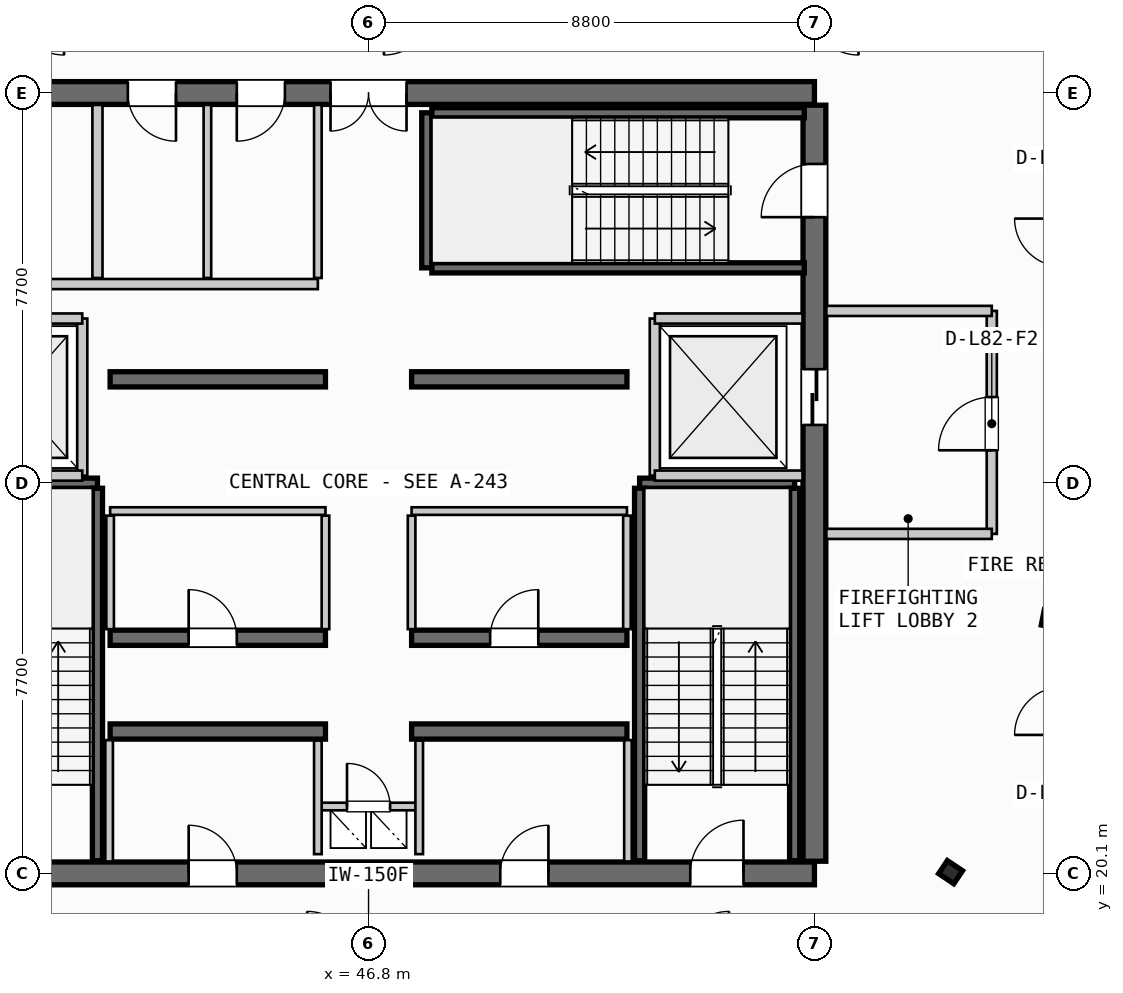
"""IFC4 building model, lengths in metres.
Left out: names, types, materials, properties, quantities, classifications, styles, units other than length and angle.
Written with IfcOpenShell. Run it as: python <this file> out.ifc"""

import sys

from ifc_helpers import new_model, si_unit, direction, frame, frame_2d, origin, origin_2d, place, context, subcontext, project, spatial, rectangle, i_section, extrude, source, transform, mapped, element, fill, save


model = new_model("IFC4")
c1 = context("Model", 3, precision=1e-05, world=origin(), true_north=direction((0.0, 1.0)))
c2 = subcontext(c1, "Body", "Model", "MODEL_VIEW")
j1 = project(units=[si_unit("LENGTHUNIT", "METRE"), si_unit("PLANEANGLEUNIT", "RADIAN")], contexts=[c1])
p1 = place(None, origin())
s1 = spatial("IfcSite", under=j1, at=p1, CompositionType="ELEMENT")
p2 = place(p1, origin())
s2 = spatial("IfcBuilding", under=s1, at=p2, CompositionType="ELEMENT")
p3 = place(p2, frame((0.0, 0.0, 308.3)))
s3 = spatial("IfcBuildingStorey", under=s2, at=p3, CompositionType="ELEMENT", Elevation=308.3)
p4 = place(p3, frame((38.0, 20.1, 0.0), z_axis=(0.0, 0.0, 1.0), x_axis=(1.0, 0.0, 0.0)))
e1 = element("IfcWall", 1, at=p4, inside=s3, PredefinedType="SHEAR", context=c2, shape_type="SweptSolid", body=[
    extrude(rectangle(XDim=17.6, YDim=0.45, at=frame_2d((8.8, 0.0))), origin(), (0.0, 0.0, 1.0), 3.735),
])
p5 = place(p4, frame((1.4, 0.0, 0.0)))
e2 = element("IfcOpeningElement", 2, at=p5, cuts=e1, PredefinedType="OPENING", context=c2, shape_type="SweptSolid", body=[
    extrude(rectangle(XDim=1.05, YDim=2.15, at=frame_2d((0.525, 1.075))), frame((0.0, 0.235, 0.0), z_axis=(0.0, -1.0, 0.0), x_axis=(1.0, 0.0, 0.0)), (0.0, 0.0, 1.0), 0.47),
])
p6 = place(p4, frame((15.15, 0.0, 0.0)))
e3 = element("IfcOpeningElement", 3, at=p6, cuts=e1, PredefinedType="OPENING", context=c2, shape_type="SweptSolid", body=[
    extrude(rectangle(XDim=1.05, YDim=2.15, at=frame_2d((0.525, 1.075))), frame((0.0, 0.235, 0.0), z_axis=(0.0, -1.0, 0.0), x_axis=(1.0, 0.0, 0.0)), (0.0, 0.0, 1.0), 0.47),
])
p7 = place(p4, frame((5.25, 0.0, 0.0)))
e4 = element("IfcOpeningElement", 4, at=p7, cuts=e1, PredefinedType="OPENING", context=c2, shape_type="SweptSolid", body=[
    extrude(rectangle(XDim=0.95, YDim=2.15, at=frame_2d((0.475, 1.075))), frame((0.0, 0.235, 0.0), z_axis=(0.0, -1.0, 0.0), x_axis=(1.0, 0.0, 0.0)), (0.0, 0.0, 1.0), 0.47),
])
p8 = place(p4, frame((11.4, 0.0, 0.0)))
e5 = element("IfcOpeningElement", 5, at=p8, cuts=e1, PredefinedType="OPENING", context=c2, shape_type="SweptSolid", body=[
    extrude(rectangle(XDim=0.95, YDim=2.15, at=frame_2d((0.475, 1.075))), frame((0.0, 0.235, 0.0), z_axis=(0.0, -1.0, 0.0), x_axis=(1.0, 0.0, 0.0)), (0.0, 0.0, 1.0), 0.47),
])
p9 = place(p3, frame((55.6, 35.5, 0.0), z_axis=(0.0, 0.0, 1.0), x_axis=(-1.0, 0.0, 0.0)))
e6 = element("IfcWall", 6, at=p9, inside=s3, PredefinedType="SHEAR", context=c2, shape_type="SweptSolid", body=[
    extrude(rectangle(XDim=17.6, YDim=0.45, at=frame_2d((8.8, 0.0))), origin(), (0.0, 0.0, 1.0), 3.735),
])
p10 = place(p9, frame((8.05, 0.0, 0.0)))
e7 = element("IfcOpeningElement", 7, at=p10, cuts=e6, PredefinedType="OPENING", context=c2, shape_type="SweptSolid", body=[
    extrude(rectangle(XDim=1.5, YDim=2.2, at=frame_2d((0.75, 1.1))), frame((0.0, 0.235, 0.0), z_axis=(0.0, -1.0, 0.0), x_axis=(1.0, 0.0, 0.0)), (0.0, 0.0, 1.0), 0.47),
])
p11 = place(p9, frame((15.1, 0.0, 0.0)))
e8 = element("IfcOpeningElement", 8, at=p11, cuts=e6, PredefinedType="OPENING", context=c2, shape_type="SweptSolid", body=[
    extrude(rectangle(XDim=0.95, YDim=2.15, at=frame_2d((0.475, 1.075))), frame((0.0, 0.235, 0.0), z_axis=(0.0, -1.0, 0.0), x_axis=(1.0, 0.0, 0.0)), (0.0, 0.0, 1.0), 0.47),
])
p12 = place(p9, frame((12.6, 0.0, 0.0)))
e9 = element("IfcOpeningElement", 9, at=p12, cuts=e6, PredefinedType="OPENING", context=c2, shape_type="SweptSolid", body=[
    extrude(rectangle(XDim=0.95, YDim=2.15, at=frame_2d((0.475, 1.075))), frame((0.0, 0.235, 0.0), z_axis=(0.0, -1.0, 0.0), x_axis=(1.0, 0.0, 0.0)), (0.0, 0.0, 1.0), 0.47),
])
p13 = place(p9, frame((10.45, 0.0, 0.0)))
e10 = element("IfcOpeningElement", 10, at=p13, cuts=e6, PredefinedType="OPENING", context=c2, shape_type="SweptSolid", body=[
    extrude(rectangle(XDim=0.95, YDim=2.15, at=frame_2d((0.475, 1.075))), frame((0.0, 0.235, 0.0), z_axis=(0.0, -1.0, 0.0), x_axis=(1.0, 0.0, 0.0)), (0.0, 0.0, 1.0), 0.47),
])
p14 = place(p3, frame((55.6, 20.34, 0.0), z_axis=(0.0, 0.0, 1.0), x_axis=(0.0, 1.0, 0.0)))
e11 = element("IfcWall", 11, at=p14, inside=s3, PredefinedType="SHEAR", context=c2, shape_type="SweptSolid", body=[
    extrude(rectangle(XDim=14.92, YDim=0.45, at=frame_2d((7.46, 0.0))), origin(), (0.0, 0.0, 1.0), 3.735),
])
p15 = place(p14, frame((12.71, 0.0, 0.0)))
e12 = element("IfcOpeningElement", 12, at=p15, cuts=e11, PredefinedType="OPENING", context=c2, shape_type="SweptSolid", body=[
    extrude(rectangle(XDim=1.05, YDim=2.15, at=frame_2d((0.525, 1.075))), frame((0.0, 0.235, 0.0), z_axis=(0.0, -1.0, 0.0), x_axis=(1.0, 0.0, 0.0)), (0.0, 0.0, 1.0), 0.47),
])
p16 = place(p14, frame((8.61, 0.0, 0.0)))
e13 = element("IfcOpeningElement", 13, at=p16, cuts=e11, PredefinedType="OPENING", context=c2, shape_type="SweptSolid", body=[
    extrude(rectangle(XDim=1.1, YDim=2.2, at=frame_2d((0.55, 1.1))), frame((0.0, 0.235, 0.0), z_axis=(0.0, -1.0, 0.0), x_axis=(1.0, 0.0, 0.0)), (0.0, 0.0, 1.0), 0.47),
])
for number, where, z_axis, x_axis in (
    (14, (41.7, 22.9, 0.0), (0.0, 0.0, 1.0), (1.0, 0.0, 0.0)),
    (15, (47.65, 22.9, 0.0), (0.0, 0.0, 1.0), (1.0, 0.0, 0.0)),
):
    element("IfcWall", number, at=place(p3, frame(where, z_axis=z_axis, x_axis=x_axis)), inside=s3, PredefinedType="SHEAR", context=c2, shape_type="SweptSolid", body=[
        extrude(rectangle(XDim=4.25, YDim=0.3, at=frame_2d((2.125, 0.0))), origin(), (0.0, 0.0, 1.0), 3.735),
    ])
p17 = place(p3, frame((41.7, 24.75, 0.0), z_axis=(0.0, 0.0, 1.0), x_axis=(1.0, 0.0, 0.0)))
e16 = element("IfcWall", 16, at=p17, inside=s3, PredefinedType="SHEAR", context=c2, shape_type="SweptSolid", body=[
    extrude(rectangle(XDim=4.25, YDim=0.3, at=frame_2d((2.125, 0.0))), origin(), (0.0, 0.0, 1.0), 3.735),
])
p18 = place(p17, frame((1.55, 0.0, 0.0)))
e17 = element("IfcOpeningElement", 17, at=p18, cuts=e16, PredefinedType="OPENING", context=c2, shape_type="SweptSolid", body=[
    extrude(rectangle(XDim=0.95, YDim=2.15, at=frame_2d((0.475, 1.075))), frame((0.0, 0.16, 0.0), z_axis=(0.0, -1.0, 0.0), x_axis=(1.0, 0.0, 0.0)), (0.0, 0.0, 1.0), 0.32),
])
p19 = place(p3, frame((47.65, 24.75, 0.0), z_axis=(0.0, 0.0, 1.0), x_axis=(1.0, 0.0, 0.0)))
e18 = element("IfcWall", 18, at=p19, inside=s3, PredefinedType="SHEAR", context=c2, shape_type="SweptSolid", body=[
    extrude(rectangle(XDim=4.25, YDim=0.3, at=frame_2d((2.125, 0.0))), origin(), (0.0, 0.0, 1.0), 3.735),
])
p20 = place(p19, frame((1.55, 0.0, 0.0)))
e19 = element("IfcOpeningElement", 19, at=p20, cuts=e18, PredefinedType="OPENING", context=c2, shape_type="SweptSolid", body=[
    extrude(rectangle(XDim=0.95, YDim=2.15, at=frame_2d((0.475, 1.075))), frame((0.0, 0.16, 0.0), z_axis=(0.0, -1.0, 0.0), x_axis=(1.0, 0.0, 0.0)), (0.0, 0.0, 1.0), 0.32),
])
for number, where, z_axis, x_axis in (
    (20, (41.7, 29.85, 0.0), (0.0, 0.0, 1.0), (1.0, 0.0, 0.0)),
    (21, (47.65, 29.85, 0.0), (0.0, 0.0, 1.0), (1.0, 0.0, 0.0)),
):
    element("IfcWall", number, at=place(p3, frame(where, z_axis=z_axis, x_axis=x_axis)), inside=s3, PredefinedType="SHEAR", context=c2, shape_type="SweptSolid", body=[
        extrude(rectangle(XDim=4.25, YDim=0.3, at=frame_2d((2.125, 0.0))), origin(), (0.0, 0.0, 1.0), 3.735),
    ])
m1 = source(origin(), c2, "Body", "SweptSolid", [
    extrude(i_section(OverallWidth=0.309, OverallDepth=0.359, WebThickness=0.016, FlangeThickness=0.026, FilletRadius=0.027, at=origin_2d()), origin(), (0.0, 0.0, 1.0), 3.735),
])
for number, where, z_axis, x_axis in (
    (22, (58.287, 20.125, 0.0), (0.0, 0.0, 1.0), (0.831, -0.556, 0.0)),
    (23, (60.284, 25.118, 0.0), (0.0, 0.0, 1.0), (0.981, -0.195, 0.0)),
):
    element("IfcColumn", number, at=place(p3, frame(where, z_axis=z_axis, x_axis=x_axis)), inside=s3, PredefinedType="COLUMN", context=c2, shape_type="MappedRepresentation", body=[
        mapped(m1, transform((0.0, 0.0, 0.0), scale=1.0)),
    ])
p21 = place(p3, frame((38.39, 27.8, 0.0), z_axis=(0.0, 0.0, 1.0), x_axis=(1.0, 0.0, 0.0)))
e24 = element("IfcWall", 24, at=p21, inside=s3, PredefinedType="SHEAR", context=c2, shape_type="SweptSolid", body=[
    extrude(rectangle(XDim=3.06, YDim=0.2, at=frame_2d((1.53, 0.0))), origin(), (0.0, 0.0, 1.0), 3.735),
])
p22 = place(p3, frame((41.45, 27.7, 0.0), z_axis=(0.0, 0.0, 1.0), x_axis=(0.0, -1.0, 0.0)))
e25 = element("IfcWall", 25, at=p22, inside=s3, PredefinedType="SHEAR", context=c2, shape_type="SweptSolid", body=[
    extrude(rectangle(XDim=7.35, YDim=0.2, at=frame_2d((3.675, 0.0))), origin(), (0.0, 0.0, 1.0), 3.735),
])
p23 = place(p3, frame((52.15, 27.8, 0.0), z_axis=(0.0, 0.0, 1.0), x_axis=(1.0, 0.0, 0.0)))
e26 = element("IfcWall", 26, at=p23, inside=s3, PredefinedType="SHEAR", context=c2, shape_type="SweptSolid", body=[
    extrude(rectangle(XDim=3.06, YDim=0.2, at=frame_2d((1.53, 0.0))), origin(), (0.0, 0.0, 1.0), 3.735),
])
for number, where, z_axis, x_axis in (
    (27, (55.21, 27.7, 0.0), (0.0, 0.0, 1.0), (0.0, -1.0, 0.0)),
    (28, (52.15, 20.35, 0.0), (0.0, 0.0, 1.0), (0.0, 1.0, 0.0)),
):
    element("IfcWall", number, at=place(p3, frame(where, z_axis=z_axis, x_axis=x_axis)), inside=s3, PredefinedType="SHEAR", context=c2, shape_type="SweptSolid", body=[
        extrude(rectangle(XDim=7.35, YDim=0.2, at=frame_2d((3.675, 0.0))), origin(), (0.0, 0.0, 1.0), 3.735),
    ])
p24 = place(p3, frame((47.95, 32.05, 0.0), z_axis=(0.0, 0.0, 1.0), x_axis=(0.0, 1.0, 0.0)))
e29 = element("IfcWall", 29, at=p24, inside=s3, PredefinedType="SHEAR", context=c2, shape_type="SweptSolid", body=[
    extrude(rectangle(XDim=3.06, YDim=0.2, at=frame_2d((1.53, 0.0))), origin(), (0.0, 0.0, 1.0), 3.735),
])
for number, where, z_axis, x_axis in (
    (30, (48.05, 35.11, 0.0), (0.0, 0.0, 1.0), (1.0, 0.0, 0.0)),
    (31, (55.4, 32.05, 0.0), (0.0, 0.0, 1.0), (-1.0, 0.0, 0.0)),
):
    element("IfcWall", number, at=place(p3, frame(where, z_axis=z_axis, x_axis=x_axis)), inside=s3, PredefinedType="SHEAR", context=c2, shape_type="SweptSolid", body=[
        extrude(rectangle(XDim=7.35, YDim=0.2, at=frame_2d((3.675, 0.0))), origin(), (0.0, 0.0, 1.0), 3.735),
    ])
p25 = place(p3, frame((45.8, 21.42, 0.0), z_axis=(0.0, 0.0, 1.0), x_axis=(1.0, 0.0, 0.0)))
e32 = element("IfcWall", 32, at=p25, inside=s3, PredefinedType="PARTITIONING", context=c2, shape_type="SweptSolid", body=[
    extrude(rectangle(XDim=2.0, YDim=0.15, at=frame_2d((1.0, 0.0))), origin(), (0.0, 0.0, 1.0), 3.26),
])
p26 = place(p25, frame((0.575, 0.0, 0.0)))
e33 = element("IfcOpeningElement", 33, at=p26, cuts=e32, PredefinedType="OPENING", context=c2, shape_type="SweptSolid", body=[
    extrude(rectangle(XDim=0.85, YDim=2.15, at=frame_2d((0.425, 1.075))), frame((0.0, 0.085, 0.0), z_axis=(0.0, -1.0, 0.0), x_axis=(1.0, 0.0, 0.0)), (0.0, 0.0, 1.0), 0.17),
])
for number, where, z_axis, x_axis in (
    (34, (45.8, 20.48, 0.0), (0.0, 0.0, 1.0), (0.0, 1.0, 0.0)),
    (35, (47.8, 20.48, 0.0), (0.0, 0.0, 1.0), (0.0, 1.0, 0.0)),
):
    element("IfcWall", number, at=place(p3, frame(where, z_axis=z_axis, x_axis=x_axis)), inside=s3, PredefinedType="PARTITIONING", context=c2, shape_type="SweptSolid", body=[
        extrude(rectangle(XDim=2.24, YDim=0.15, at=frame_2d((1.12, 0.0))), origin(), (0.0, 0.0, 1.0), 3.26),
    ])
p27 = place(p3, frame((41.15, 27.95, 0.0), z_axis=(0.0, 0.0, 1.0), x_axis=(0.0, 1.0, 0.0)))
e36 = element("IfcWall", 36, at=p27, inside=s3, PredefinedType="PARTITIONING", context=c2, shape_type="SweptSolid", body=[
    extrude(rectangle(XDim=3.1, YDim=0.2, at=frame_2d((1.55, 0.0))), origin(), (0.0, 0.0, 1.0), 3.26),
])
for number, where, z_axis, x_axis in (
    (37, (38.235, 27.95, 0.0), (0.0, 0.0, 1.0), (1.0, 0.0, 0.0)),
    (38, (38.235, 31.05, 0.0), (0.0, 0.0, 1.0), (1.0, 0.0, 0.0)),
):
    element("IfcWall", number, at=place(p3, frame(where, z_axis=z_axis, x_axis=x_axis)), inside=s3, PredefinedType="PARTITIONING", context=c2, shape_type="SweptSolid", body=[
        extrude(rectangle(XDim=2.915, YDim=0.2, at=frame_2d((1.458, 0.0))), origin(), (0.0, 0.0, 1.0), 3.26),
    ])
p28 = place(p3, frame((52.45, 27.95, 0.0), z_axis=(0.0, 0.0, 1.0), x_axis=(0.0, 1.0, 0.0)))
e39 = element("IfcWall", 39, at=p28, inside=s3, PredefinedType="PARTITIONING", context=c2, shape_type="SweptSolid", body=[
    extrude(rectangle(XDim=3.1, YDim=0.2, at=frame_2d((1.55, 0.0))), origin(), (0.0, 0.0, 1.0), 3.26),
])
for number, where, z_axis, x_axis in (
    (40, (52.45, 27.95, 0.0), (0.0, 0.0, 1.0), (1.0, 0.0, 0.0)),
    (41, (52.45, 31.05, 0.0), (0.0, 0.0, 1.0), (1.0, 0.0, 0.0)),
):
    element("IfcWall", number, at=place(p3, frame(where, z_axis=z_axis, x_axis=x_axis)), inside=s3, PredefinedType="PARTITIONING", context=c2, shape_type="SweptSolid", body=[
        extrude(rectangle(XDim=2.915, YDim=0.2, at=frame_2d((1.458, 0.0))), origin(), (0.0, 0.0, 1.0), 3.26),
    ])
p29 = place(p3, frame((59.1, 26.8, 0.0), z_axis=(0.0, 0.0, 1.0), x_axis=(0.0, 1.0, 0.0)))
e42 = element("IfcWall", 42, at=p29, inside=s3, PredefinedType="PARTITIONING", context=c2, shape_type="SweptSolid", body=[
    extrude(rectangle(XDim=4.4, YDim=0.2, at=frame_2d((2.2, 0.0))), origin(), (0.0, 0.0, 1.0), 3.26),
])
p30 = place(p29, frame((1.65, 0.0, 0.0)))
e43 = element("IfcOpeningElement", 43, at=p30, cuts=e42, PredefinedType="OPENING", context=c2, shape_type="SweptSolid", body=[
    extrude(rectangle(XDim=1.05, YDim=2.15, at=frame_2d((0.525, 1.075))), frame((0.0, 0.11, 0.0), z_axis=(0.0, -1.0, 0.0), x_axis=(1.0, 0.0, 0.0)), (0.0, 0.0, 1.0), 0.22),
])
for number, where, z_axis, x_axis in (
    (44, (55.835, 26.8, 0.0), (0.0, 0.0, 1.0), (1.0, 0.0, 0.0)),
    (45, (55.835, 31.2, 0.0), (0.0, 0.0, 1.0), (1.0, 0.0, 0.0)),
):
    element("IfcWall", number, at=place(p3, frame(where, z_axis=z_axis, x_axis=x_axis)), inside=s3, PredefinedType="PARTITIONING", context=c2, shape_type="SweptSolid", body=[
        extrude(rectangle(XDim=3.265, YDim=0.2, at=frame_2d((1.633, 0.0))), origin(), (0.0, 0.0, 1.0), 3.26),
    ])
for number, where, z_axis, x_axis in (
    (46, (41.68, 20.335, 0.0), (0.0, 0.0, 1.0), (0.0, 1.0, 0.0)),
    (47, (51.92, 20.335, 0.0), (0.0, 0.0, 1.0), (0.0, 1.0, 0.0)),
):
    element("IfcWall", number, at=place(p3, frame(where, z_axis=z_axis, x_axis=x_axis)), inside=s3, PredefinedType="PARTITIONING", context=c2, shape_type="SweptSolid", body=[
        extrude(rectangle(XDim=2.395, YDim=0.15, at=frame_2d((1.198, 0.0))), origin(), (0.0, 0.0, 1.0), 3.26),
    ])
for number, where, z_axis, x_axis in (
    (48, (41.7, 27.25, 0.0), (0.0, 0.0, 1.0), (1.0, 0.0, 0.0)),
    (49, (47.65, 27.25, 0.0), (0.0, 0.0, 1.0), (1.0, 0.0, 0.0)),
):
    element("IfcWall", number, at=place(p3, frame(where, z_axis=z_axis, x_axis=x_axis)), inside=s3, PredefinedType="PARTITIONING", context=c2, shape_type="SweptSolid", body=[
        extrude(rectangle(XDim=4.25, YDim=0.15, at=frame_2d((2.125, 0.0))), origin(), (0.0, 0.0, 1.0), 3.26),
    ])
for number, where, z_axis, x_axis in (
    (50, (41.7, 24.92, 0.0), (0.0, 0.0, 1.0), (0.0, 1.0, 0.0)),
    (51, (45.95, 24.92, 0.0), (0.0, 0.0, 1.0), (0.0, 1.0, 0.0)),
    (52, (47.65, 24.92, 0.0), (0.0, 0.0, 1.0), (0.0, 1.0, 0.0)),
    (53, (51.9, 24.92, 0.0), (0.0, 0.0, 1.0), (0.0, 1.0, 0.0)),
):
    element("IfcWall", number, at=place(p3, frame(where, z_axis=z_axis, x_axis=x_axis)), inside=s3, PredefinedType="PARTITIONING", context=c2, shape_type="SweptSolid", body=[
        extrude(rectangle(XDim=2.24, YDim=0.15, at=frame_2d((1.12, 0.0))), origin(), (0.0, 0.0, 1.0), 3.26),
    ])
p31 = place(p3, frame((41.45, 31.85, 0.0), z_axis=(0.0, 0.0, 1.0), x_axis=(0.0, 1.0, 0.0)))
e54 = element("IfcWall", 54, at=p31, inside=s3, PredefinedType="PARTITIONING", context=c2, shape_type="SweptSolid", body=[
    extrude(rectangle(XDim=3.415, YDim=0.2, at=frame_2d((1.708, 0.0))), origin(), (0.0, 0.0, 1.0), 3.26),
])
p32 = place(p3, frame((38.235, 31.73, 0.0), z_axis=(0.0, 0.0, 1.0), x_axis=(1.0, 0.0, 0.0)))
e55 = element("IfcWall", 55, at=p32, inside=s3, PredefinedType="PARTITIONING", context=c2, shape_type="SweptSolid", body=[
    extrude(rectangle(XDim=7.565, YDim=0.2, at=frame_2d((3.782, 0.0))), origin(), (0.0, 0.0, 1.0), 3.26),
])
p33 = place(p3, frame((45.8, 31.85, 0.0), z_axis=(0.0, 0.0, 1.0), x_axis=(0.0, 1.0, 0.0)))
e56 = element("IfcWall", 56, at=p33, inside=s3, PredefinedType="PARTITIONING", context=c2, shape_type="SweptSolid", body=[
    extrude(rectangle(XDim=3.415, YDim=0.15, at=frame_2d((1.708, 0.0))), origin(), (0.0, 0.0, 1.0), 3.26),
])
p34 = place(p3, frame((43.62, 31.85, 0.0), z_axis=(0.0, 0.0, 1.0), x_axis=(0.0, 1.0, 0.0)))
e57 = element("IfcWall", 57, at=p34, inside=s3, PredefinedType="PLUMBINGWALL", context=c2, shape_type="SweptSolid", body=[
    extrude(rectangle(XDim=3.415, YDim=0.15, at=frame_2d((1.708, 0.0))), origin(), (0.0, 0.0, 1.0), 3.26),
])
m2 = source(origin(), c2, "Body", "SweptSolid", [
    extrude(rectangle(XDim=1.05, YDim=2.15, at=frame_2d((0.525, 1.075))), frame((0.0, 0.025, 0.0), z_axis=(0.0, -1.0, 0.0), x_axis=(1.0, 0.0, 0.0)), (0.0, 0.0, 1.0), 0.05),
])
p35 = place(p6, origin())
e58 = element("IfcDoor", 58, at=p35, inside=s3, OperationType="SINGLE_SWING_RIGHT", PredefinedType="DOOR", context=c2, shape_type="MappedRepresentation", body=[
    mapped(m2, transform((0.0, 0.0, 0.0), scale=1.0)),
])
fill(e3, e58)
p36 = place(p15, origin())
e59 = element("IfcDoor", 59, at=p36, inside=s3, OperationType="SINGLE_SWING_LEFT", PredefinedType="DOOR", context=c2, shape_type="MappedRepresentation", body=[
    mapped(m2, transform((0.0, 0.0, 0.0), scale=1.0)),
])
fill(e12, e59)
m3 = source(origin(), c2, "Body", "SweptSolid", [
    extrude(rectangle(XDim=1.5, YDim=2.2, at=frame_2d((0.75, 1.1))), frame((0.0, 0.025, 0.0), z_axis=(0.0, -1.0, 0.0), x_axis=(1.0, 0.0, 0.0)), (0.0, 0.0, 1.0), 0.05),
])
p37 = place(p10, origin())
e60 = element("IfcDoor", 60, at=p37, inside=s3, OperationType="DOUBLE_DOOR_SINGLE_SWING", PredefinedType="DOOR", context=c2, shape_type="MappedRepresentation", body=[
    mapped(m3, transform((0.0, 0.0, 0.0), scale=1.0)),
])
fill(e7, e60)
m4 = source(origin(), c2, "Body", "SweptSolid", [
    extrude(rectangle(XDim=1.1, YDim=2.2, at=frame_2d((0.55, 1.1))), frame((0.0, 0.025, 0.0), z_axis=(0.0, -1.0, 0.0), x_axis=(1.0, 0.0, 0.0)), (0.0, 0.0, 1.0), 0.05),
])
p38 = place(p16, origin())
e61 = element("IfcDoor", 61, at=p38, inside=s3, OperationType="SLIDING_TO_RIGHT", PredefinedType="DOOR", context=c2, shape_type="MappedRepresentation", body=[
    mapped(m4, transform((0.0, 0.0, 0.0), scale=1.0)),
])
fill(e13, e61)
m5 = source(origin(), c2, "Body", "SweptSolid", [
    extrude(rectangle(XDim=0.95, YDim=2.15, at=frame_2d((0.475, 1.075))), frame((0.0, 0.025, 0.0), z_axis=(0.0, -1.0, 0.0), x_axis=(1.0, 0.0, 0.0)), (0.0, 0.0, 1.0), 0.05),
])
p39 = place(p7, origin())
e62 = element("IfcDoor", 62, at=p39, inside=s3, OperationType="SINGLE_SWING_LEFT", PredefinedType="DOOR", context=c2, shape_type="MappedRepresentation", body=[
    mapped(m5, transform((0.0, 0.0, 0.0), scale=1.0)),
])
fill(e4, e62)
p40 = place(p8, origin())
e63 = element("IfcDoor", 63, at=p40, inside=s3, OperationType="SINGLE_SWING_RIGHT", PredefinedType="DOOR", context=c2, shape_type="MappedRepresentation", body=[
    mapped(m5, transform((0.0, 0.0, 0.0), scale=1.0)),
])
fill(e5, e63)
p41 = place(p18, origin())
e64 = element("IfcDoor", 64, at=p41, inside=s3, OperationType="SINGLE_SWING_LEFT", PredefinedType="DOOR", context=c2, shape_type="MappedRepresentation", body=[
    mapped(m5, transform((0.0, 0.0, 0.0), scale=1.0)),
])
fill(e17, e64)
p42 = place(p20, origin())
e65 = element("IfcDoor", 65, at=p42, inside=s3, OperationType="SINGLE_SWING_RIGHT", PredefinedType="DOOR", context=c2, shape_type="MappedRepresentation", body=[
    mapped(m5, transform((0.0, 0.0, 0.0), scale=1.0)),
])
fill(e19, e65)
p43 = place(p12, origin())
e66 = element("IfcDoor", 66, at=p43, inside=s3, OperationType="SINGLE_SWING_LEFT", PredefinedType="DOOR", context=c2, shape_type="MappedRepresentation", body=[
    mapped(m5, transform((0.0, 0.0, 0.0), scale=1.0)),
])
fill(e9, e66)
p44 = place(p13, origin())
e67 = element("IfcDoor", 67, at=p44, inside=s3, OperationType="SINGLE_SWING_RIGHT", PredefinedType="DOOR", context=c2, shape_type="MappedRepresentation", body=[
    mapped(m5, transform((0.0, 0.0, 0.0), scale=1.0)),
])
fill(e10, e67)
p45 = place(p30, origin())
e68 = element("IfcDoor", 68, at=p45, inside=s3, OperationType="SINGLE_SWING_LEFT", PredefinedType="DOOR", context=c2, shape_type="MappedRepresentation", body=[
    mapped(m2, transform((0.0, 0.0, 0.0), scale=1.0)),
])
fill(e43, e68)
m6 = source(origin(), c2, "Body", "SweptSolid", [
    extrude(rectangle(XDim=0.85, YDim=2.15, at=frame_2d((0.425, 1.075))), frame((0.0, 0.025, 0.0), z_axis=(0.0, -1.0, 0.0), x_axis=(1.0, 0.0, 0.0)), (0.0, 0.0, 1.0), 0.05),
])
p46 = place(p26, origin())
e69 = element("IfcDoor", 69, at=p46, inside=s3, OperationType="SINGLE_SWING_LEFT", PredefinedType="DOOR", context=c2, shape_type="MappedRepresentation", body=[
    mapped(m6, transform((0.0, 0.0, 0.0), scale=1.0)),
])
fill(e33, e69)
save(model, sys.argv[1])
